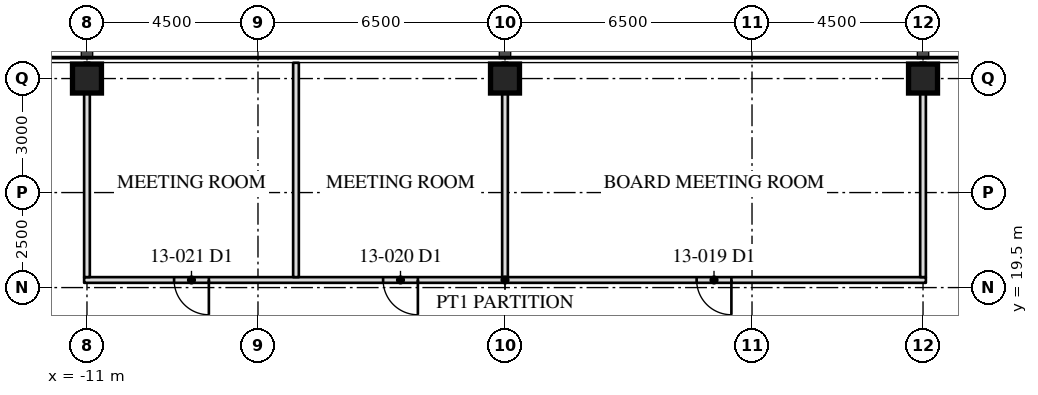
"""IFC4 building model, lengths in metres.
Left out: names, types, materials, properties, quantities, classifications, styles, units other than length and angle.
Written with IfcOpenShell. Run it as: python <this file> out.ifc"""

import sys

from ifc_helpers import new_model, si_unit, direction, frame, frame_2d, origin, origin_2d, place, context, subcontext, project, spatial, rectangle, hollow_rectangle, extrude, element, fill, save


model = new_model("IFC4")
c1 = context("Model", 3, precision=1e-05, world=origin(), true_north=direction((0.0, 1.0)))
c2 = subcontext(c1, "Body", "Model", "MODEL_VIEW")
j1 = project(units=[si_unit("LENGTHUNIT", "METRE"), si_unit("PLANEANGLEUNIT", "RADIAN")], contexts=[c1])
p1 = place(None, origin())
s1 = spatial("IfcSite", under=j1, at=p1, CompositionType="ELEMENT")
p2 = place(p1, origin())
s2 = spatial("IfcBuilding", under=s1, at=p2, CompositionType="ELEMENT")
p3 = place(p2, frame((0.0, 0.0, 57.0)))
s3 = spatial("IfcBuildingStorey", under=s2, at=p3, CompositionType="ELEMENT", Elevation=57.0)
for number, where, z_axis, x_axis in (
    (1, (11.0, 25.0, 0.0), (0.0, 0.0, 1.0), (1.0, 0.0, 0.0)),
    (2, (0.0, 25.0, 0.0), (0.0, 0.0, 1.0), (1.0, 0.0, 0.0)),
    (3, (-11.0, 25.0, 0.0), (0.0, 0.0, 1.0), (1.0, 0.0, 0.0)),
):
    element("IfcColumn", number, at=place(p3, frame(where, z_axis=z_axis, x_axis=x_axis)), inside=s3, PredefinedType="COLUMN", context=c2, shape_type="SweptSolid", body=[
        extrude(hollow_rectangle(XDim=0.762, YDim=0.762, WallThickness=0.127, at=origin_2d()), origin(), (0.0, 0.0, 1.0), 4.1),
    ])
p4 = place(p3, frame((11.075, 19.7, 0.0), z_axis=(0.0, 0.0, 1.0), x_axis=(-1.0, 0.0, 0.0)))
e4 = element("IfcWall", 4, at=p4, inside=s3, PredefinedType="PARTITIONING", context=c2, shape_type="SweptSolid", body=[
    extrude(rectangle(XDim=22.15, YDim=0.15, at=frame_2d((11.075, 0.0))), origin(), (0.0, 0.0, 1.0), 3.91),
])
p5 = place(p4, frame((5.117, 0.0, 0.0)))
e5 = element("IfcOpeningElement", 5, at=p5, cuts=e4, PredefinedType="OPENING", context=c2, shape_type="SweptSolid", body=[
    extrude(rectangle(XDim=0.915, YDim=2.134, at=frame_2d((0.458, 1.067))), frame((0.0, 0.085, 0.0), z_axis=(0.0, -1.0, 0.0), x_axis=(1.0, 0.0, 0.0)), (0.0, 0.0, 1.0), 0.17),
])
p6 = place(p4, frame((13.367, 0.0, 0.0)))
e6 = element("IfcOpeningElement", 6, at=p6, cuts=e4, PredefinedType="OPENING", context=c2, shape_type="SweptSolid", body=[
    extrude(rectangle(XDim=0.915, YDim=2.134, at=frame_2d((0.458, 1.067))), frame((0.0, 0.085, 0.0), z_axis=(0.0, -1.0, 0.0), x_axis=(1.0, 0.0, 0.0)), (0.0, 0.0, 1.0), 0.17),
])
p7 = place(p4, frame((18.867, 0.0, 0.0)))
e7 = element("IfcOpeningElement", 7, at=p7, cuts=e4, PredefinedType="OPENING", context=c2, shape_type="SweptSolid", body=[
    extrude(rectangle(XDim=0.915, YDim=2.134, at=frame_2d((0.458, 1.067))), frame((0.0, 0.085, 0.0), z_axis=(0.0, -1.0, 0.0), x_axis=(1.0, 0.0, 0.0)), (0.0, 0.0, 1.0), 0.17),
])
for number, where, z_axis, x_axis in (
    (8, (11.0, 19.775, 0.0), (0.0, 0.0, 1.0), (0.0, 1.0, 0.0)),
    (9, (0.0, 19.775, 0.0), (0.0, 0.0, 1.0), (0.0, 1.0, 0.0)),
):
    element("IfcWall", number, at=place(p3, frame(where, z_axis=z_axis, x_axis=x_axis)), inside=s3, PredefinedType="PARTITIONING", context=c2, shape_type="SweptSolid", body=[
        extrude(rectangle(XDim=5.64, YDim=0.15, at=frame_2d((2.82, 0.0))), origin(), (0.0, 0.0, 1.0), 3.13),
    ])
p8 = place(p3, frame((-5.5, 19.775, 0.0), z_axis=(0.0, 0.0, 1.0), x_axis=(0.0, 1.0, 0.0)))
e10 = element("IfcWall", 10, at=p8, inside=s3, PredefinedType="PARTITIONING", context=c2, shape_type="SweptSolid", body=[
    extrude(rectangle(XDim=5.64, YDim=0.15, at=frame_2d((2.82, 0.0))), origin(), (0.0, 0.0, 1.0), 3.91),
])
p9 = place(p3, frame((-11.0, 19.775, 0.0), z_axis=(0.0, 0.0, 1.0), x_axis=(0.0, 1.0, 0.0)))
e11 = element("IfcWall", 11, at=p9, inside=s3, PredefinedType="PARTITIONING", context=c2, shape_type="SweptSolid", body=[
    extrude(rectangle(XDim=5.64, YDim=0.15, at=frame_2d((2.82, 0.0))), origin(), (0.0, 0.0, 1.0), 3.13),
])
p10 = place(p5, origin())
e12 = element("IfcDoor", 12, at=p10, inside=s3, OperationType="SINGLE_SWING_LEFT", PredefinedType="DOOR", context=c2, shape_type="SweptSolid", body=[
    extrude(rectangle(XDim=0.915, YDim=2.134, at=frame_2d((0.458, 1.067))), frame((0.0, 0.025, 0.0), z_axis=(0.0, -1.0, 0.0), x_axis=(1.0, 0.0, 0.0)), (0.0, 0.0, 1.0), 0.05),
])
fill(e5, e12)
p11 = place(p6, origin())
e13 = element("IfcDoor", 13, at=p11, inside=s3, OperationType="SINGLE_SWING_LEFT", PredefinedType="DOOR", context=c2, shape_type="SweptSolid", body=[
    extrude(rectangle(XDim=0.915, YDim=2.134, at=frame_2d((0.458, 1.067))), frame((0.0, 0.025, 0.0), z_axis=(0.0, -1.0, 0.0), x_axis=(1.0, 0.0, 0.0)), (0.0, 0.0, 1.0), 0.05),
])
fill(e6, e13)
p12 = place(p7, origin())
e14 = element("IfcDoor", 14, at=p12, inside=s3, OperationType="SINGLE_SWING_LEFT", PredefinedType="DOOR", context=c2, shape_type="SweptSolid", body=[
    extrude(rectangle(XDim=0.915, YDim=2.134, at=frame_2d((0.458, 1.067))), frame((0.0, 0.025, 0.0), z_axis=(0.0, -1.0, 0.0), x_axis=(1.0, 0.0, 0.0)), (0.0, 0.0, 1.0), 0.05),
])
fill(e7, e14)
save(model, sys.argv[1])
